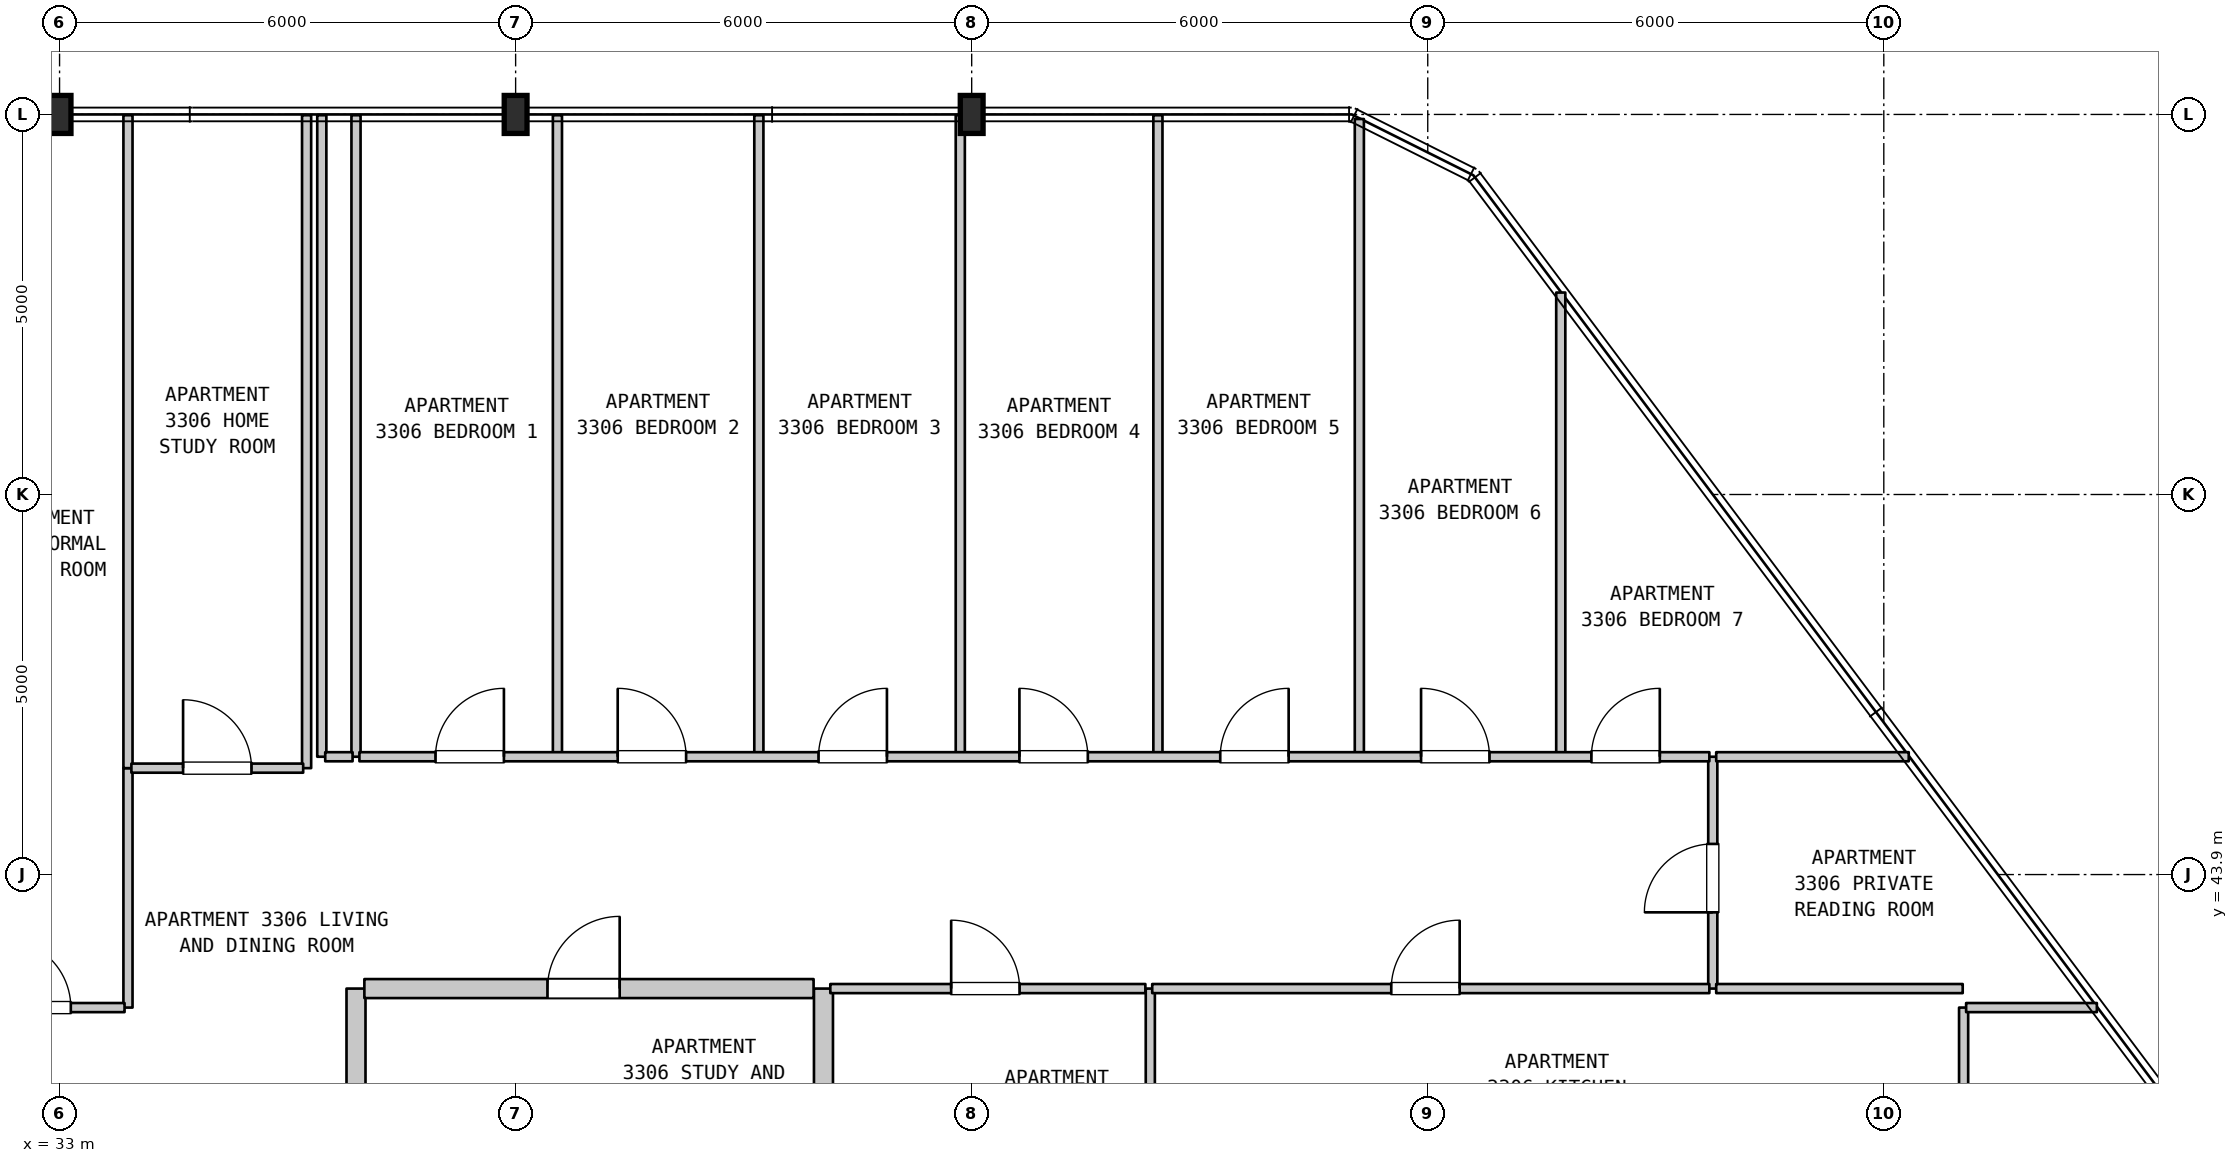
"""IFC4 building model, lengths in metres.
Left out: names, types, materials, properties, quantities, classifications, styles, units other than length and angle.
Written with IfcOpenShell. Run it as: python <this file> out.ifc"""

import sys

from ifc_helpers import new_model, si_unit, direction, frame, frame_2d, origin, origin_2d, place, context, subcontext, project, spatial, rectangle, i_section, extrude, element, fill, save


model = new_model("IFC4")
c1 = context("Model", 3, precision=1e-05, world=origin(), true_north=direction((0.0, 1.0)))
c2 = subcontext(c1, "Body", "Model", "MODEL_VIEW")
j1 = project(units=[si_unit("LENGTHUNIT", "METRE"), si_unit("PLANEANGLEUNIT", "RADIAN")], contexts=[c1])
p1 = place(None, origin())
s1 = spatial("IfcSite", under=j1, at=p1, CompositionType="ELEMENT")
p2 = place(p1, origin())
s2 = spatial("IfcBuilding", under=s1, at=p2, CompositionType="ELEMENT")
p3 = place(p2, frame((0.0, 0.0, 137.2)))
s3 = spatial("IfcBuildingStorey", under=s2, at=p3, CompositionType="ELEMENT", Elevation=137.2)
for number, where, z_axis, x_axis in (
    (1, (33.0, 53.9, 0.0), (0.0, 0.0, 1.0), (1.0, 0.0, 0.0)),
    (2, (39.0, 53.9, 0.0), (0.0, 0.0, 1.0), (1.0, 0.0, 0.0)),
    (3, (45.0, 53.9, 0.0), (0.0, 0.0, 1.0), (1.0, 0.0, 0.0)),
):
    element("IfcColumn", number, at=place(p3, frame(where, z_axis=z_axis, x_axis=x_axis)), inside=s3, PredefinedType="COLUMN", context=c2, shape_type="SweptSolid", body=[
        extrude(i_section(OverallWidth=0.3, OverallDepth=0.5, WebThickness=0.014, FlangeThickness=0.028, FilletRadius=0.027, at=origin_2d()), origin(), (0.0, 0.0, 1.0), 3.7),
    ])
p4 = place(p3, frame((33.9, 42.15, 0.0), z_axis=(0.0, 0.0, 1.0), x_axis=(0.0, 1.0, 0.0)))
e4 = element("IfcWall", 4, at=p4, inside=s3, PredefinedType="PARTITIONING", context=c2, shape_type="SweptSolid", body=[
    extrude(rectangle(XDim=3.15, YDim=0.12, at=frame_2d((1.575, 0.0))), origin(), (0.0, 0.0, 1.0), 3.385),
])
for number, where, z_axis, x_axis in (
    (5, (33.9, 45.3, 0.0), (0.0, 0.0, 1.0), (0.0, 1.0, 0.0)),
    (6, (36.25, 45.3, 0.0), (0.0, 0.0, 1.0), (0.0, 1.0, 0.0)),
):
    element("IfcWall", number, at=place(p3, frame(where, z_axis=z_axis, x_axis=x_axis)), inside=s3, PredefinedType="PARTITIONING", context=c2, shape_type="SweptSolid", body=[
        extrude(rectangle(XDim=8.59, YDim=0.12, at=frame_2d((4.295, 0.0))), origin(), (0.0, 0.0, 1.0), 3.385),
    ])
p5 = place(p3, frame((36.45, 45.45, 0.0), z_axis=(0.0, 0.0, 1.0), x_axis=(0.0, 1.0, 0.0)))
e7 = element("IfcWall", 7, at=p5, inside=s3, PredefinedType="PARTITIONING", context=c2, shape_type="SweptSolid", body=[
    extrude(rectangle(XDim=8.44, YDim=0.12, at=frame_2d((4.22, 0.0))), origin(), (0.0, 0.0, 1.0), 3.385),
])
p6 = place(p3, frame((36.9, 40.1, 0.0), z_axis=(0.0, 0.0, 1.0), x_axis=(0.0, 1.0, 0.0)))
e8 = element("IfcWall", 8, at=p6, inside=s3, PredefinedType="STANDARD", context=c2, shape_type="SweptSolid", body=[
    extrude(rectangle(XDim=2.3, YDim=0.25, at=frame_2d((1.15, 0.0))), origin(), (0.0, 0.0, 1.0), 3.385),
])
for number, where, z_axis, x_axis in (
    (9, (36.9, 45.45, 0.0), (0.0, 0.0, 1.0), (0.0, 1.0, 0.0)),
    (10, (39.55, 45.45, 0.0), (0.0, 0.0, 1.0), (0.0, 1.0, 0.0)),
    (11, (42.2, 45.45, 0.0), (0.0, 0.0, 1.0), (0.0, 1.0, 0.0)),
):
    element("IfcWall", number, at=place(p3, frame(where, z_axis=z_axis, x_axis=x_axis)), inside=s3, PredefinedType="PARTITIONING", context=c2, shape_type="SweptSolid", body=[
        extrude(rectangle(XDim=8.44, YDim=0.12, at=frame_2d((4.22, 0.0))), origin(), (0.0, 0.0, 1.0), 3.385),
    ])
p7 = place(p3, frame((43.05, 40.1, 0.0), z_axis=(0.0, 0.0, 1.0), x_axis=(0.0, 1.0, 0.0)))
e12 = element("IfcWall", 12, at=p7, inside=s3, PredefinedType="STANDARD", context=c2, shape_type="SweptSolid", body=[
    extrude(rectangle(XDim=2.3, YDim=0.25, at=frame_2d((1.15, 0.0))), origin(), (0.0, 0.0, 1.0), 3.385),
])
p8 = place(p3, frame((44.85, 45.45, 0.0), z_axis=(0.0, 0.0, 1.0), x_axis=(0.0, 1.0, 0.0)))
e13 = element("IfcWall", 13, at=p8, inside=s3, PredefinedType="PARTITIONING", context=c2, shape_type="SweptSolid", body=[
    extrude(rectangle(XDim=8.44, YDim=0.12, at=frame_2d((4.22, 0.0))), origin(), (0.0, 0.0, 1.0), 3.385),
])
p9 = place(p3, frame((47.35, 40.1, 0.0), z_axis=(0.0, 0.0, 1.0), x_axis=(0.0, 1.0, 0.0)))
e14 = element("IfcWall", 14, at=p9, inside=s3, PredefinedType="PARTITIONING", context=c2, shape_type="SweptSolid", body=[
    extrude(rectangle(XDim=2.3, YDim=0.12, at=frame_2d((1.15, 0.0))), origin(), (0.0, 0.0, 1.0), 3.385),
])
p10 = place(p3, frame((47.45, 45.45, 0.0), z_axis=(0.0, 0.0, 1.0), x_axis=(0.0, 1.0, 0.0)))
e15 = element("IfcWall", 15, at=p10, inside=s3, PredefinedType="PARTITIONING", context=c2, shape_type="SweptSolid", body=[
    extrude(rectangle(XDim=8.44, YDim=0.12, at=frame_2d((4.22, 0.0))), origin(), (0.0, 0.0, 1.0), 3.385),
])
p11 = place(p3, frame((50.1, 45.45, 0.0), z_axis=(0.0, 0.0, 1.0), x_axis=(0.0, 1.0, 0.0)))
e16 = element("IfcWall", 16, at=p11, inside=s3, PredefinedType="PARTITIONING", context=c2, shape_type="SweptSolid", body=[
    extrude(rectangle(XDim=8.39, YDim=0.12, at=frame_2d((4.195, 0.0))), origin(), (0.0, 0.0, 1.0), 3.385),
])
p12 = place(p3, frame((52.75, 45.45, 0.0), z_axis=(0.0, 0.0, 1.0), x_axis=(0.0, 1.0, 0.0)))
e17 = element("IfcWall", 17, at=p12, inside=s3, PredefinedType="PARTITIONING", context=c2, shape_type="SweptSolid", body=[
    extrude(rectangle(XDim=6.107, YDim=0.12, at=frame_2d((3.053, 0.0))), origin(), (0.0, 0.0, 1.0), 3.385),
])
p13 = place(p3, frame((54.75, 42.4, 0.0), z_axis=(0.0, 0.0, 1.0), x_axis=(0.0, 1.0, 0.0)))
e18 = element("IfcWall", 18, at=p13, inside=s3, PredefinedType="PARTITIONING", context=c2, shape_type="SweptSolid", body=[
    extrude(rectangle(XDim=3.05, YDim=0.12, at=frame_2d((1.525, 0.0))), origin(), (0.0, 0.0, 1.0), 3.385),
])
p14 = place(p13, frame((1.003, 0.0, 0.0)))
e19 = element("IfcOpeningElement", 19, at=p14, cuts=e18, PredefinedType="OPENING", context=c2, shape_type="SweptSolid", body=[
    extrude(rectangle(XDim=0.9, YDim=2.15, at=frame_2d((0.45, 1.075))), frame((0.0, 0.07, 0.0), z_axis=(0.0, -1.0, 0.0), x_axis=(1.0, 0.0, 0.0)), (0.0, 0.0, 1.0), 0.14),
])
p15 = place(p3, frame((58.05, 40.1, 0.0), z_axis=(0.0, 0.0, 1.0), x_axis=(0.0, 1.0, 0.0)))
e20 = element("IfcWall", 20, at=p15, inside=s3, PredefinedType="PARTITIONING", context=c2, shape_type="SweptSolid", body=[
    extrude(rectangle(XDim=2.05, YDim=0.12, at=frame_2d((1.025, 0.0))), origin(), (0.0, 0.0, 1.0), 3.385),
])
p16 = place(p3, frame((31.695, 42.15, 0.0), z_axis=(0.0, 0.0, 1.0), x_axis=(1.0, 0.0, 0.0)))
e21 = element("IfcWall", 21, at=p16, inside=s3, PredefinedType="PARTITIONING", context=c2, shape_type="SweptSolid", body=[
    extrude(rectangle(XDim=2.16, YDim=0.12, at=frame_2d((1.08, 0.0))), origin(), (0.0, 0.0, 1.0), 3.385),
])
p17 = place(p16, frame((0.553, 0.0, 0.0)))
e22 = element("IfcOpeningElement", 22, at=p17, cuts=e21, PredefinedType="OPENING", context=c2, shape_type="SweptSolid", body=[
    extrude(rectangle(XDim=0.9, YDim=2.15, at=frame_2d((0.45, 1.075))), frame((0.0, 0.07, 0.0), z_axis=(0.0, -1.0, 0.0), x_axis=(1.0, 0.0, 0.0)), (0.0, 0.0, 1.0), 0.14),
])
p18 = place(p3, frame((58.083, 42.15, 0.0), z_axis=(0.0, 0.0, 1.0), x_axis=(1.0, 0.0, 0.0)))
e23 = element("IfcWall", 23, at=p18, inside=s3, PredefinedType="PARTITIONING", context=c2, shape_type="SweptSolid", body=[
    extrude(rectangle(XDim=1.72, YDim=0.12, at=frame_2d((0.86, 0.0))), origin(), (0.0, 0.0, 1.0), 3.385),
])
p19 = place(p3, frame((37.01, 42.4, 0.0), z_axis=(0.0, 0.0, 1.0), x_axis=(1.0, 0.0, 0.0)))
e24 = element("IfcWall", 24, at=p19, inside=s3, PredefinedType="STANDARD", context=c2, shape_type="SweptSolid", body=[
    extrude(rectangle(XDim=5.91, YDim=0.25, at=frame_2d((2.955, 0.0))), origin(), (0.0, 0.0, 1.0), 3.385),
])
p20 = place(p19, frame((2.409, 0.0, 0.0)))
e25 = element("IfcOpeningElement", 25, at=p20, cuts=e24, PredefinedType="OPENING", context=c2, shape_type="SweptSolid", body=[
    extrude(rectangle(XDim=0.95, YDim=2.15, at=frame_2d((0.475, 1.075))), frame((0.0, 0.135, 0.0), z_axis=(0.0, -1.0, 0.0), x_axis=(1.0, 0.0, 0.0)), (0.0, 0.0, 1.0), 0.27),
])
p21 = place(p3, frame((43.14, 42.4, 0.0), z_axis=(0.0, 0.0, 1.0), x_axis=(1.0, 0.0, 0.0)))
e26 = element("IfcWall", 26, at=p21, inside=s3, PredefinedType="PARTITIONING", context=c2, shape_type="SweptSolid", body=[
    extrude(rectangle(XDim=4.145, YDim=0.12, at=frame_2d((2.073, 0.0))), origin(), (0.0, 0.0, 1.0), 3.385),
])
p22 = place(p21, frame((1.59, 0.0, 0.0)))
e27 = element("IfcOpeningElement", 27, at=p22, cuts=e26, PredefinedType="OPENING", context=c2, shape_type="SweptSolid", body=[
    extrude(rectangle(XDim=0.9, YDim=2.1, at=frame_2d((0.45, 1.05))), frame((0.0, 0.07, 0.0), z_axis=(0.0, -1.0, 0.0), x_axis=(1.0, 0.0, 0.0)), (0.0, 0.0, 1.0), 0.14),
])
p23 = place(p3, frame((47.375, 42.4, 0.0), z_axis=(0.0, 0.0, 1.0), x_axis=(1.0, 0.0, 0.0)))
e28 = element("IfcWall", 28, at=p23, inside=s3, PredefinedType="PARTITIONING", context=c2, shape_type="SweptSolid", body=[
    extrude(rectangle(XDim=7.33, YDim=0.12, at=frame_2d((3.665, 0.0))), origin(), (0.0, 0.0, 1.0), 3.385),
])
p24 = place(p23, frame((3.145, 0.0, 0.0)))
e29 = element("IfcOpeningElement", 29, at=p24, cuts=e28, PredefinedType="OPENING", context=c2, shape_type="SweptSolid", body=[
    extrude(rectangle(XDim=0.9, YDim=2.15, at=frame_2d((0.45, 1.075))), frame((0.0, 0.07, 0.0), z_axis=(0.0, -1.0, 0.0), x_axis=(1.0, 0.0, 0.0)), (0.0, 0.0, 1.0), 0.14),
])
p25 = place(p3, frame((54.795, 42.4, 0.0), z_axis=(0.0, 0.0, 1.0), x_axis=(1.0, 0.0, 0.0)))
e30 = element("IfcWall", 30, at=p25, inside=s3, PredefinedType="PARTITIONING", context=c2, shape_type="SweptSolid", body=[
    extrude(rectangle(XDim=3.243, YDim=0.12, at=frame_2d((1.622, 0.0))), origin(), (0.0, 0.0, 1.0), 3.385),
])
p26 = place(p3, frame((33.945, 45.3, 0.0), z_axis=(0.0, 0.0, 1.0), x_axis=(1.0, 0.0, 0.0)))
e31 = element("IfcWall", 31, at=p26, inside=s3, PredefinedType="PARTITIONING", context=c2, shape_type="SweptSolid", body=[
    extrude(rectangle(XDim=2.26, YDim=0.12, at=frame_2d((1.13, 0.0))), origin(), (0.0, 0.0, 1.0), 3.385),
])
p27 = place(p26, frame((0.68, 0.0, 0.0)))
e32 = element("IfcOpeningElement", 32, at=p27, cuts=e31, PredefinedType="OPENING", context=c2, shape_type="SweptSolid", body=[
    extrude(rectangle(XDim=0.9, YDim=2.15, at=frame_2d((0.45, 1.075))), frame((0.0, 0.07, 0.0), z_axis=(0.0, -1.0, 0.0), x_axis=(1.0, 0.0, 0.0)), (0.0, 0.0, 1.0), 0.14),
])
p28 = place(p3, frame((36.495, 45.45, 0.0), z_axis=(0.0, 0.0, 1.0), x_axis=(1.0, 0.0, 0.0)))
e33 = element("IfcWall", 33, at=p28, inside=s3, PredefinedType="PARTITIONING", context=c2, shape_type="SweptSolid", body=[
    extrude(rectangle(XDim=0.36, YDim=0.12, at=frame_2d((0.18, 0.0))), origin(), (0.0, 0.0, 1.0), 3.385),
])
p29 = place(p3, frame((36.945, 45.45, 0.0), z_axis=(0.0, 0.0, 1.0), x_axis=(1.0, 0.0, 0.0)))
e34 = element("IfcWall", 34, at=p29, inside=s3, PredefinedType="PARTITIONING", context=c2, shape_type="SweptSolid", body=[
    extrude(rectangle(XDim=17.76, YDim=0.12, at=frame_2d((8.88, 0.0))), origin(), (0.0, 0.0, 1.0), 3.385),
])
p30 = place(p29, frame((1.001, 0.0, 0.0)))
e35 = element("IfcOpeningElement", 35, at=p30, cuts=e34, PredefinedType="OPENING", context=c2, shape_type="SweptSolid", body=[
    extrude(rectangle(XDim=0.9, YDim=2.15, at=frame_2d((0.45, 1.075))), frame((0.0, 0.07, 0.0), z_axis=(0.0, -1.0, 0.0), x_axis=(1.0, 0.0, 0.0)), (0.0, 0.0, 1.0), 0.14),
])
p31 = place(p29, frame((3.398, 0.0, 0.0)))
e36 = element("IfcOpeningElement", 36, at=p31, cuts=e34, PredefinedType="OPENING", context=c2, shape_type="SweptSolid", body=[
    extrude(rectangle(XDim=0.9, YDim=2.15, at=frame_2d((0.45, 1.075))), frame((0.0, 0.07, 0.0), z_axis=(0.0, -1.0, 0.0), x_axis=(1.0, 0.0, 0.0)), (0.0, 0.0, 1.0), 0.14),
])
p32 = place(p29, frame((6.04, 0.0, 0.0)))
e37 = element("IfcOpeningElement", 37, at=p32, cuts=e34, PredefinedType="OPENING", context=c2, shape_type="SweptSolid", body=[
    extrude(rectangle(XDim=0.9, YDim=2.15, at=frame_2d((0.45, 1.075))), frame((0.0, 0.07, 0.0), z_axis=(0.0, -1.0, 0.0), x_axis=(1.0, 0.0, 0.0)), (0.0, 0.0, 1.0), 0.14),
])
p33 = place(p29, frame((8.683, 0.0, 0.0)))
e38 = element("IfcOpeningElement", 38, at=p33, cuts=e34, PredefinedType="OPENING", context=c2, shape_type="SweptSolid", body=[
    extrude(rectangle(XDim=0.9, YDim=2.15, at=frame_2d((0.45, 1.075))), frame((0.0, 0.07, 0.0), z_axis=(0.0, -1.0, 0.0), x_axis=(1.0, 0.0, 0.0)), (0.0, 0.0, 1.0), 0.14),
])
p34 = place(p29, frame((11.325, 0.0, 0.0)))
e39 = element("IfcOpeningElement", 39, at=p34, cuts=e34, PredefinedType="OPENING", context=c2, shape_type="SweptSolid", body=[
    extrude(rectangle(XDim=0.9, YDim=2.15, at=frame_2d((0.45, 1.075))), frame((0.0, 0.07, 0.0), z_axis=(0.0, -1.0, 0.0), x_axis=(1.0, 0.0, 0.0)), (0.0, 0.0, 1.0), 0.14),
])
p35 = place(p29, frame((13.967, 0.0, 0.0)))
e40 = element("IfcOpeningElement", 40, at=p35, cuts=e34, PredefinedType="OPENING", context=c2, shape_type="SweptSolid", body=[
    extrude(rectangle(XDim=0.9, YDim=2.15, at=frame_2d((0.45, 1.075))), frame((0.0, 0.07, 0.0), z_axis=(0.0, -1.0, 0.0), x_axis=(1.0, 0.0, 0.0)), (0.0, 0.0, 1.0), 0.14),
])
p36 = place(p29, frame((16.208, 0.0, 0.0)))
e41 = element("IfcOpeningElement", 41, at=p36, cuts=e34, PredefinedType="OPENING", context=c2, shape_type="SweptSolid", body=[
    extrude(rectangle(XDim=0.9, YDim=2.15, at=frame_2d((0.45, 1.075))), frame((0.0, 0.07, 0.0), z_axis=(0.0, -1.0, 0.0), x_axis=(1.0, 0.0, 0.0)), (0.0, 0.0, 1.0), 0.14),
])
p37 = place(p3, frame((54.795, 45.45, 0.0), z_axis=(0.0, 0.0, 1.0), x_axis=(1.0, 0.0, 0.0)))
e42 = element("IfcWall", 42, at=p37, inside=s3, PredefinedType="PARTITIONING", context=c2, shape_type="SweptSolid", body=[
    extrude(rectangle(XDim=2.533, YDim=0.12, at=frame_2d((1.267, 0.0))), origin(), (0.0, 0.0, 1.0), 3.385),
])
p38 = place(p14, origin())
e43 = element("IfcDoor", 43, at=p38, inside=s3, OperationType="SINGLE_SWING_LEFT", PredefinedType="DOOR", context=c2, shape_type="SweptSolid", body=[
    extrude(rectangle(XDim=0.9, YDim=2.15, at=frame_2d((0.45, 1.075))), frame((0.0, 0.025, 0.0), z_axis=(0.0, -1.0, 0.0), x_axis=(1.0, 0.0, 0.0)), (0.0, 0.0, 1.0), 0.05),
])
fill(e19, e43)
p39 = place(p17, origin())
e44 = element("IfcDoor", 44, at=p39, inside=s3, OperationType="SINGLE_SWING_LEFT", PredefinedType="DOOR", context=c2, shape_type="SweptSolid", body=[
    extrude(rectangle(XDim=0.9, YDim=2.15, at=frame_2d((0.45, 1.075))), frame((0.0, 0.025, 0.0), z_axis=(0.0, -1.0, 0.0), x_axis=(1.0, 0.0, 0.0)), (0.0, 0.0, 1.0), 0.05),
])
fill(e22, e44)
p40 = place(p20, origin())
e45 = element("IfcDoor", 45, at=p40, inside=s3, OperationType="SINGLE_SWING_RIGHT", PredefinedType="DOOR", context=c2, shape_type="SweptSolid", body=[
    extrude(rectangle(XDim=0.95, YDim=2.15, at=frame_2d((0.475, 1.075))), frame((0.0, 0.025, 0.0), z_axis=(0.0, -1.0, 0.0), x_axis=(1.0, 0.0, 0.0)), (0.0, 0.0, 1.0), 0.05),
])
fill(e25, e45)
p41 = place(p22, origin())
e46 = element("IfcDoor", 46, at=p41, inside=s3, OperationType="SINGLE_SWING_LEFT", PredefinedType="DOOR", context=c2, shape_type="SweptSolid", body=[
    extrude(rectangle(XDim=0.9, YDim=2.1, at=frame_2d((0.45, 1.05))), frame((0.0, 0.025, 0.0), z_axis=(0.0, -1.0, 0.0), x_axis=(1.0, 0.0, 0.0)), (0.0, 0.0, 1.0), 0.05),
])
fill(e27, e46)
p42 = place(p24, origin())
e47 = element("IfcDoor", 47, at=p42, inside=s3, OperationType="SINGLE_SWING_RIGHT", PredefinedType="DOOR", context=c2, shape_type="SweptSolid", body=[
    extrude(rectangle(XDim=0.9, YDim=2.15, at=frame_2d((0.45, 1.075))), frame((0.0, 0.025, 0.0), z_axis=(0.0, -1.0, 0.0), x_axis=(1.0, 0.0, 0.0)), (0.0, 0.0, 1.0), 0.05),
])
fill(e29, e47)
p43 = place(p27, origin())
e48 = element("IfcDoor", 48, at=p43, inside=s3, OperationType="SINGLE_SWING_LEFT", PredefinedType="DOOR", context=c2, shape_type="SweptSolid", body=[
    extrude(rectangle(XDim=0.9, YDim=2.15, at=frame_2d((0.45, 1.075))), frame((0.0, 0.025, 0.0), z_axis=(0.0, -1.0, 0.0), x_axis=(1.0, 0.0, 0.0)), (0.0, 0.0, 1.0), 0.05),
])
fill(e32, e48)
p44 = place(p30, origin())
e49 = element("IfcDoor", 49, at=p44, inside=s3, OperationType="SINGLE_SWING_RIGHT", PredefinedType="DOOR", context=c2, shape_type="SweptSolid", body=[
    extrude(rectangle(XDim=0.9, YDim=2.15, at=frame_2d((0.45, 1.075))), frame((0.0, 0.025, 0.0), z_axis=(0.0, -1.0, 0.0), x_axis=(1.0, 0.0, 0.0)), (0.0, 0.0, 1.0), 0.05),
])
fill(e35, e49)
p45 = place(p31, origin())
e50 = element("IfcDoor", 50, at=p45, inside=s3, OperationType="SINGLE_SWING_LEFT", PredefinedType="DOOR", context=c2, shape_type="SweptSolid", body=[
    extrude(rectangle(XDim=0.9, YDim=2.15, at=frame_2d((0.45, 1.075))), frame((0.0, 0.025, 0.0), z_axis=(0.0, -1.0, 0.0), x_axis=(1.0, 0.0, 0.0)), (0.0, 0.0, 1.0), 0.05),
])
fill(e36, e50)
p46 = place(p32, origin())
e51 = element("IfcDoor", 51, at=p46, inside=s3, OperationType="SINGLE_SWING_RIGHT", PredefinedType="DOOR", context=c2, shape_type="SweptSolid", body=[
    extrude(rectangle(XDim=0.9, YDim=2.15, at=frame_2d((0.45, 1.075))), frame((0.0, 0.025, 0.0), z_axis=(0.0, -1.0, 0.0), x_axis=(1.0, 0.0, 0.0)), (0.0, 0.0, 1.0), 0.05),
])
fill(e37, e51)
p47 = place(p33, origin())
e52 = element("IfcDoor", 52, at=p47, inside=s3, OperationType="SINGLE_SWING_LEFT", PredefinedType="DOOR", context=c2, shape_type="SweptSolid", body=[
    extrude(rectangle(XDim=0.9, YDim=2.15, at=frame_2d((0.45, 1.075))), frame((0.0, 0.025, 0.0), z_axis=(0.0, -1.0, 0.0), x_axis=(1.0, 0.0, 0.0)), (0.0, 0.0, 1.0), 0.05),
])
fill(e38, e52)
p48 = place(p34, origin())
e53 = element("IfcDoor", 53, at=p48, inside=s3, OperationType="SINGLE_SWING_RIGHT", PredefinedType="DOOR", context=c2, shape_type="SweptSolid", body=[
    extrude(rectangle(XDim=0.9, YDim=2.15, at=frame_2d((0.45, 1.075))), frame((0.0, 0.025, 0.0), z_axis=(0.0, -1.0, 0.0), x_axis=(1.0, 0.0, 0.0)), (0.0, 0.0, 1.0), 0.05),
])
fill(e39, e53)
p49 = place(p35, origin())
e54 = element("IfcDoor", 54, at=p49, inside=s3, OperationType="SINGLE_SWING_LEFT", PredefinedType="DOOR", context=c2, shape_type="SweptSolid", body=[
    extrude(rectangle(XDim=0.9, YDim=2.15, at=frame_2d((0.45, 1.075))), frame((0.0, 0.025, 0.0), z_axis=(0.0, -1.0, 0.0), x_axis=(1.0, 0.0, 0.0)), (0.0, 0.0, 1.0), 0.05),
])
fill(e40, e54)
p50 = place(p36, origin())
e55 = element("IfcDoor", 55, at=p50, inside=s3, OperationType="SINGLE_SWING_RIGHT", PredefinedType="DOOR", context=c2, shape_type="SweptSolid", body=[
    extrude(rectangle(XDim=0.9, YDim=2.15, at=frame_2d((0.45, 1.075))), frame((0.0, 0.025, 0.0), z_axis=(0.0, -1.0, 0.0), x_axis=(1.0, 0.0, 0.0)), (0.0, 0.0, 1.0), 0.05),
])
fill(e41, e55)
save(model, sys.argv[1])
